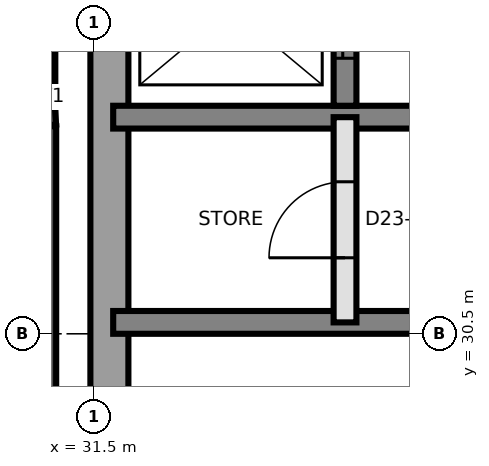
"""IFC4 building model, lengths in metres.
Left out: names, types, materials, properties, quantities, classifications, styles, units other than length and angle.
Written with IfcOpenShell. Run it as: python <this file> out.ifc"""

import sys

from ifc_helpers import new_model, si_unit, direction, frame, frame_2d, origin, place, context, subcontext, project, spatial, rectangle, extrude, element, fill, save


model = new_model("IFC4")
c1 = context("Model", 3, precision=1e-05, world=origin(), true_north=direction((0.0, 1.0)))
c2 = subcontext(c1, "Body", "Model", "MODEL_VIEW")
j1 = project(units=[si_unit("LENGTHUNIT", "METRE"), si_unit("PLANEANGLEUNIT", "RADIAN")], contexts=[c1])
p1 = place(None, origin())
s1 = spatial("IfcSite", under=j1, at=p1, CompositionType="ELEMENT")
p2 = place(p1, origin())
s2 = spatial("IfcBuilding", under=s1, at=p2, CompositionType="ELEMENT")
p3 = place(p2, frame((0.0, 0.0, 210.6)))
s3 = spatial("IfcBuildingStorey", under=s2, at=p3, CompositionType="ELEMENT", Elevation=210.6)
p4 = place(p3, frame((31.7, 21.75, 0.0), z_axis=(0.0, 0.0, 1.0), x_axis=(0.0, 1.0, 0.0)))
e1 = element("IfcWall", 1, at=p4, inside=s3, PredefinedType="SHEAR", context=c2, shape_type="SweptSolid", body=[
    extrude(rectangle(XDim=17.5, YDim=0.5, at=frame_2d((8.75, 0.0))), origin(), (0.0, 0.0, 1.0), 3.7),
])
p5 = place(p3, frame((31.75, 30.65, 0.0), z_axis=(0.0, 0.0, 1.0), x_axis=(1.0, 0.0, 0.0)))
e2 = element("IfcWall", 2, at=p5, inside=s3, PredefinedType="SHEAR", context=c2, shape_type="SweptSolid", body=[
    extrude(rectangle(XDim=26.5, YDim=0.3, at=frame_2d((13.25, 0.0))), origin(), (0.0, 0.0, 1.0), 3.7),
])
p6 = place(p5, frame((24.75, 0.0, 0.0)))
e3 = element("IfcOpeningElement", 3, at=p6, cuts=e2, PredefinedType="OPENING", context=c2, shape_type="SweptSolid", body=[
    extrude(rectangle(XDim=1.0, YDim=2.1, at=frame_2d((0.5, 1.05))), frame((0.0, 0.16, 0.0), z_axis=(0.0, -1.0, 0.0), x_axis=(1.0, 0.0, 0.0)), (0.0, 0.0, 1.0), 0.32),
])
p7 = place(p3, frame((31.75, 33.35, 0.0), z_axis=(0.0, 0.0, 1.0), x_axis=(1.0, 0.0, 0.0)))
e4 = element("IfcWall", 4, at=p7, inside=s3, PredefinedType="SHEAR", context=c2, shape_type="SweptSolid", body=[
    extrude(rectangle(XDim=26.5, YDim=0.3, at=frame_2d((13.25, 0.0))), origin(), (0.0, 0.0, 1.0), 3.7),
])
p8 = place(p7, frame((13.9, 0.0, 0.0)))
e5 = element("IfcOpeningElement", 5, at=p8, cuts=e4, PredefinedType="OPENING", context=c2, shape_type="SweptSolid", body=[
    extrude(rectangle(XDim=1.4, YDim=2.1, at=frame_2d((0.7, 1.05))), frame((0.0, 0.16, 0.0), z_axis=(0.0, -1.0, 0.0), x_axis=(1.0, 0.0, 0.0)), (0.0, 0.0, 1.0), 0.32),
])
p9 = place(p7, frame((5.375, 0.0, 0.0)))
e6 = element("IfcOpeningElement", 6, at=p9, cuts=e4, PredefinedType="OPENING", context=c2, shape_type="SweptSolid", body=[
    extrude(rectangle(XDim=1.2, YDim=2.1, at=frame_2d((0.6, 1.05))), frame((0.0, 0.16, 0.0), z_axis=(0.0, -1.0, 0.0), x_axis=(1.0, 0.0, 0.0)), (0.0, 0.0, 1.0), 0.32),
])
p10 = place(p7, frame((19.925, 0.0, 0.0)))
e7 = element("IfcOpeningElement", 7, at=p10, cuts=e4, PredefinedType="OPENING", context=c2, shape_type="SweptSolid", body=[
    extrude(rectangle(XDim=1.2, YDim=2.1, at=frame_2d((0.6, 1.05))), frame((0.0, 0.16, 0.0), z_axis=(0.0, -1.0, 0.0), x_axis=(1.0, 0.0, 0.0)), (0.0, 0.0, 1.0), 0.32),
])
p11 = place(p3, frame((34.8, 33.5, 0.0), z_axis=(0.0, 0.0, 1.0), x_axis=(0.0, 1.0, 0.0)))
e8 = element("IfcWall", 8, at=p11, inside=s3, PredefinedType="SHEAR", context=c2, shape_type="SweptSolid", body=[
    extrude(rectangle(XDim=2.55, YDim=0.3, at=frame_2d((1.275, 0.0))), origin(), (0.0, 0.0, 1.0), 3.7),
])
p12 = place(p11, frame((0.625, 0.0, 0.0)))
e9 = element("IfcOpeningElement", 9, at=p12, cuts=e8, PredefinedType="OPENING", context=c2, shape_type="SweptSolid", body=[
    extrude(rectangle(XDim=1.3, YDim=2.4, at=frame_2d((0.65, 1.2))), frame((0.0, 0.16, 0.0), z_axis=(0.0, -1.0, 0.0), x_axis=(1.0, 0.0, 0.0)), (0.0, 0.0, 1.0), 0.32),
])
p13 = place(p3, frame((30.85, 33.231, 0.0), z_axis=(0.0, 0.0, 1.0), x_axis=(0.0, -1.0, 0.0)))
e10 = element("IfcWall", 10, at=p13, inside=s3, PredefinedType="SOLIDWALL", context=c2, shape_type="SweptSolid", body=[
    extrude(rectangle(XDim=11.871, YDim=0.3, at=frame_2d((5.936, 0.0))), origin(), (0.0, 0.0, 1.0), 3.4),
])
p14 = place(p3, frame((30.795, 34.0, 0.0), z_axis=(0.0, 0.0, 1.0), x_axis=(0.07129269393, -0.997455438499, 0.0)))
e11 = element("IfcWall", 11, at=p14, inside=s3, PredefinedType="SOLIDWALL", context=c2, shape_type="SweptSolid", body=[
    extrude(rectangle(XDim=0.76, YDim=0.3, at=frame_2d((0.38, 0.0))), origin(), (0.0, 0.0, 1.0), 3.4),
])
p15 = place(p3, frame((34.8, 30.65, 0.0), z_axis=(0.0, 0.0, 1.0), x_axis=(0.0, 1.0, 0.0)))
e12 = element("IfcWall", 12, at=p15, inside=s3, PredefinedType="SOLIDWALL", context=c2, shape_type="SweptSolid", body=[
    extrude(rectangle(XDim=2.7, YDim=0.3, at=frame_2d((1.35, 0.0))), origin(), (0.0, 0.0, 1.0), 3.4),
])
p16 = place(p15, frame((0.85, 0.0, 0.0)))
e13 = element("IfcOpeningElement", 13, at=p16, cuts=e12, PredefinedType="OPENING", context=c2, shape_type="SweptSolid", body=[
    extrude(rectangle(XDim=1.0, YDim=2.1, at=frame_2d((0.5, 1.05))), frame((0.0, 0.16, 0.0), z_axis=(0.0, -1.0, 0.0), x_axis=(1.0, 0.0, 0.0)), (0.0, 0.0, 1.0), 0.32),
])
p17 = place(p12, origin())
e14 = element("IfcDoor", 14, at=p17, inside=s3, OperationType="SLIDING_TO_LEFT", PredefinedType="DOOR", context=c2, shape_type="SweptSolid", body=[
    extrude(rectangle(XDim=1.3, YDim=2.4, at=frame_2d((0.65, 1.2))), frame((0.0, 0.025, 0.0), z_axis=(0.0, -1.0, 0.0), x_axis=(1.0, 0.0, 0.0)), (0.0, 0.0, 1.0), 0.05),
])
fill(e9, e14)
p18 = place(p16, origin())
e15 = element("IfcDoor", 15, at=p18, inside=s3, OperationType="SINGLE_SWING_RIGHT", PredefinedType="DOOR", context=c2, shape_type="SweptSolid", body=[
    extrude(rectangle(XDim=1.0, YDim=2.1, at=frame_2d((0.5, 1.05))), frame((0.0, 0.025, 0.0), z_axis=(0.0, -1.0, 0.0), x_axis=(1.0, 0.0, 0.0)), (0.0, 0.0, 1.0), 0.05),
])
fill(e13, e15)
save(model, sys.argv[1])
